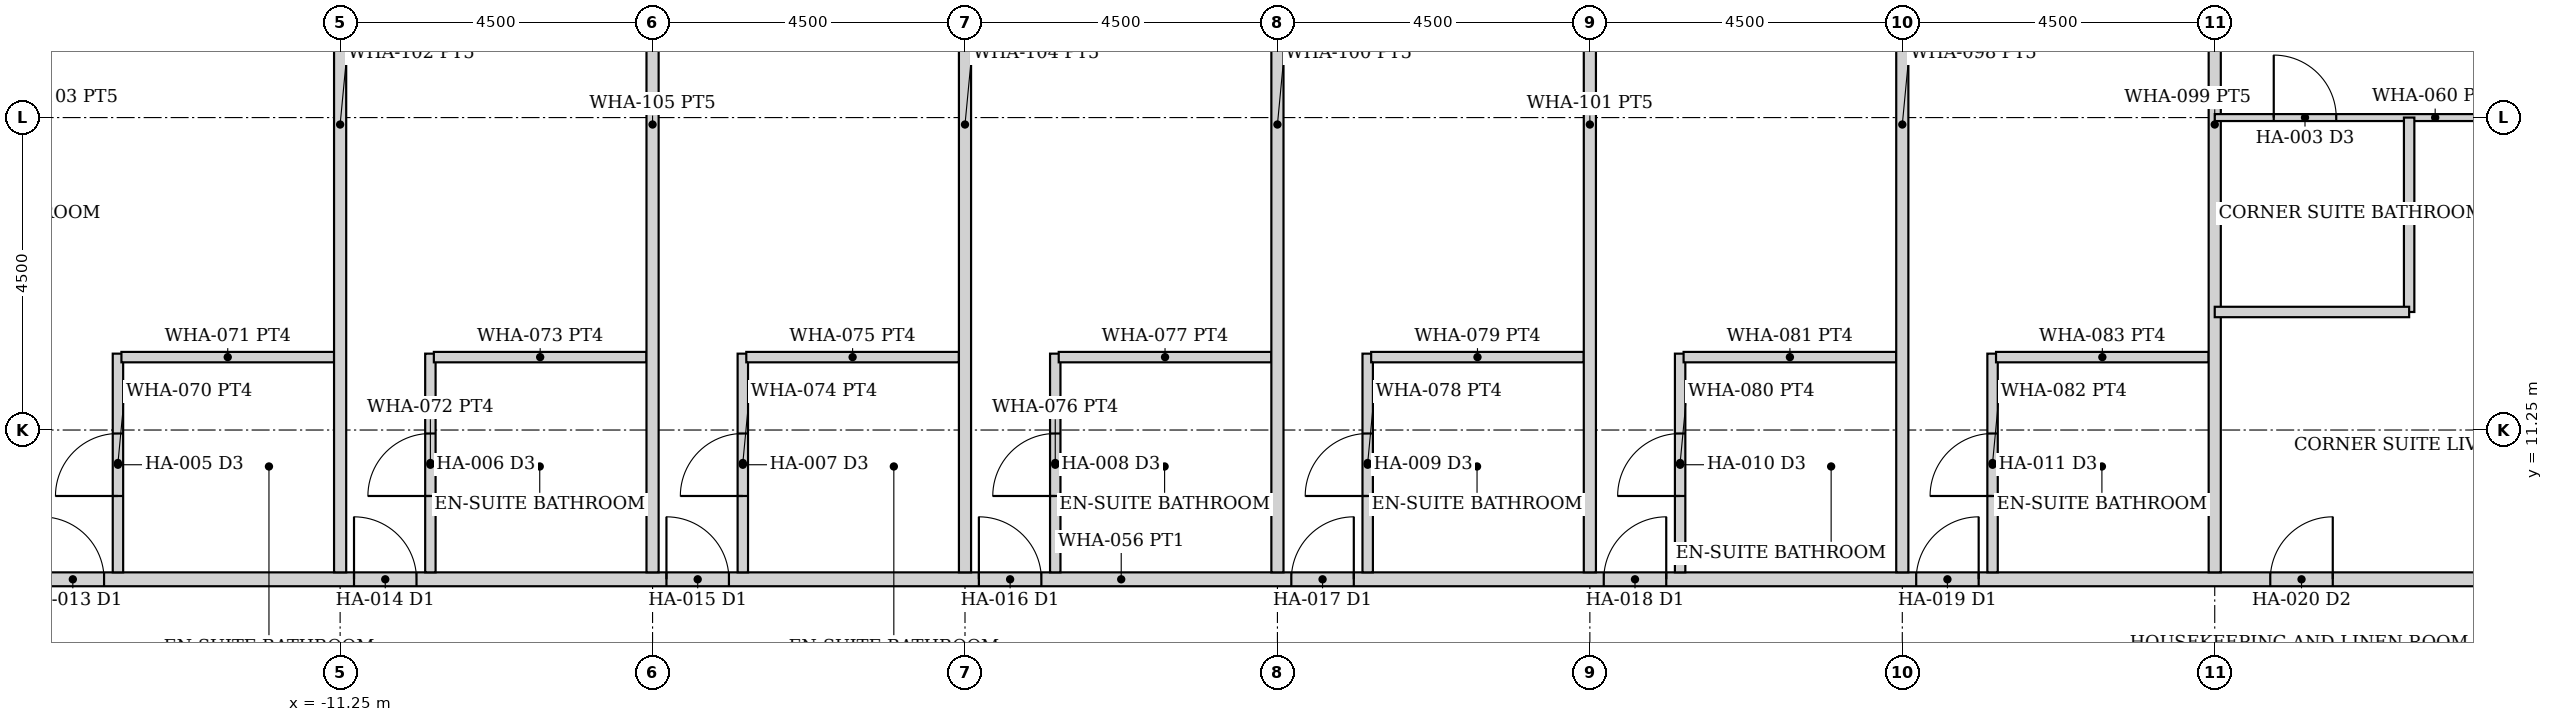
"""IFC4 building model, lengths in metres.
Left out: names, types, materials, properties, quantities, classifications, styles, units other than length and angle.
Written with IfcOpenShell. Run it as: python <this file> out.ifc"""

import sys

from ifc_helpers import new_model, si_unit, direction, frame, frame_2d, origin, place, context, subcontext, project, spatial, rectangle, extrude, element, fill, save


model = new_model("IFC4")
c1 = context("Model", 3, precision=1e-05, world=origin(), true_north=direction((0.0, 1.0)))
c2 = subcontext(c1, "Body", "Model", "MODEL_VIEW")
j1 = project(units=[si_unit("LENGTHUNIT", "METRE"), si_unit("PLANEANGLEUNIT", "RADIAN")], contexts=[c1])
p1 = place(None, origin())
s1 = spatial("IfcSite", under=j1, at=p1, CompositionType="ELEMENT")
p2 = place(p1, origin())
s2 = spatial("IfcBuilding", under=s1, at=p2, CompositionType="ELEMENT")
p3 = place(p2, frame((0.0, 0.0, 118.4)))
s3 = spatial("IfcBuildingStorey", under=s2, at=p3, CompositionType="ELEMENT", Elevation=118.4)
p4 = place(p3, frame((-22.3, 9.1, 0.0), z_axis=(0.0, 0.0, 1.0), x_axis=(1.0, 0.0, 0.0)))
e1 = element("IfcWall", 1, at=p4, inside=s3, PredefinedType="PARTITIONING", context=c2, shape_type="SweptSolid", body=[
    extrude(rectangle(XDim=44.6, YDim=0.2, at=frame_2d((22.3, 0.0))), origin(), (0.0, 0.0, 1.0), 2.473),
])
p5 = place(p4, frame((6.75, 0.0, 0.0)))
e2 = element("IfcOpeningElement", 2, at=p5, cuts=e1, PredefinedType="OPENING", context=c2, shape_type="SweptSolid", body=[
    extrude(rectangle(XDim=0.9, YDim=2.1, at=frame_2d((0.45, 1.05))), frame((0.0, 0.11, 0.0), z_axis=(0.0, -1.0, 0.0), x_axis=(1.0, 0.0, 0.0)), (0.0, 0.0, 1.0), 0.22),
])
p6 = place(p4, frame((11.25, 0.0, 0.0)))
e3 = element("IfcOpeningElement", 3, at=p6, cuts=e1, PredefinedType="OPENING", context=c2, shape_type="SweptSolid", body=[
    extrude(rectangle(XDim=0.9, YDim=2.1, at=frame_2d((0.45, 1.05))), frame((0.0, 0.11, 0.0), z_axis=(0.0, -1.0, 0.0), x_axis=(1.0, 0.0, 0.0)), (0.0, 0.0, 1.0), 0.22),
])
p7 = place(p4, frame((15.75, 0.0, 0.0)))
e4 = element("IfcOpeningElement", 4, at=p7, cuts=e1, PredefinedType="OPENING", context=c2, shape_type="SweptSolid", body=[
    extrude(rectangle(XDim=0.9, YDim=2.1, at=frame_2d((0.45, 1.05))), frame((0.0, 0.11, 0.0), z_axis=(0.0, -1.0, 0.0), x_axis=(1.0, 0.0, 0.0)), (0.0, 0.0, 1.0), 0.22),
])
p8 = place(p4, frame((20.25, 0.0, 0.0)))
e5 = element("IfcOpeningElement", 5, at=p8, cuts=e1, PredefinedType="OPENING", context=c2, shape_type="SweptSolid", body=[
    extrude(rectangle(XDim=0.9, YDim=2.1, at=frame_2d((0.45, 1.05))), frame((0.0, 0.11, 0.0), z_axis=(0.0, -1.0, 0.0), x_axis=(1.0, 0.0, 0.0)), (0.0, 0.0, 1.0), 0.22),
])
p9 = place(p4, frame((24.75, 0.0, 0.0)))
e6 = element("IfcOpeningElement", 6, at=p9, cuts=e1, PredefinedType="OPENING", context=c2, shape_type="SweptSolid", body=[
    extrude(rectangle(XDim=0.9, YDim=2.1, at=frame_2d((0.45, 1.05))), frame((0.0, 0.11, 0.0), z_axis=(0.0, -1.0, 0.0), x_axis=(1.0, 0.0, 0.0)), (0.0, 0.0, 1.0), 0.22),
])
p10 = place(p4, frame((29.25, 0.0, 0.0)))
e7 = element("IfcOpeningElement", 7, at=p10, cuts=e1, PredefinedType="OPENING", context=c2, shape_type="SweptSolid", body=[
    extrude(rectangle(XDim=0.9, YDim=2.1, at=frame_2d((0.45, 1.05))), frame((0.0, 0.11, 0.0), z_axis=(0.0, -1.0, 0.0), x_axis=(1.0, 0.0, 0.0)), (0.0, 0.0, 1.0), 0.22),
])
p11 = place(p4, frame((33.75, 0.0, 0.0)))
e8 = element("IfcOpeningElement", 8, at=p11, cuts=e1, PredefinedType="OPENING", context=c2, shape_type="SweptSolid", body=[
    extrude(rectangle(XDim=0.9, YDim=2.1, at=frame_2d((0.45, 1.05))), frame((0.0, 0.11, 0.0), z_axis=(0.0, -1.0, 0.0), x_axis=(1.0, 0.0, 0.0)), (0.0, 0.0, 1.0), 0.22),
])
p12 = place(p4, frame((38.85, 0.0, 0.0)))
e9 = element("IfcOpeningElement", 9, at=p12, cuts=e1, PredefinedType="OPENING", context=c2, shape_type="SweptSolid", body=[
    extrude(rectangle(XDim=0.9, YDim=2.1, at=frame_2d((0.45, 1.05))), frame((0.0, 0.11, 0.0), z_axis=(0.0, -1.0, 0.0), x_axis=(1.0, 0.0, 0.0)), (0.0, 0.0, 1.0), 0.22),
])
p13 = place(p4, frame((4.85, 0.0, 0.0)))
e10 = element("IfcOpeningElement", 10, at=p13, cuts=e1, PredefinedType="OPENING", context=c2, shape_type="SweptSolid", body=[
    extrude(rectangle(XDim=0.9, YDim=2.1, at=frame_2d((0.45, 1.05))), frame((0.0, 0.11, 0.0), z_axis=(0.0, -1.0, 0.0), x_axis=(1.0, 0.0, 0.0)), (0.0, 0.0, 1.0), 0.22),
])
p14 = place(p3, frame((-14.45, 9.2, 0.0), z_axis=(0.0, 0.0, 1.0), x_axis=(0.0, 1.0, 0.0)))
e11 = element("IfcWall", 11, at=p14, inside=s3, PredefinedType="PARTITIONING", context=c2, shape_type="SweptSolid", body=[
    extrude(rectangle(XDim=3.15, YDim=0.15, at=frame_2d((1.575, 0.0))), origin(), (0.0, 0.0, 1.0), 2.473),
])
p15 = place(p14, frame((1.1, 0.0, 0.0)))
e12 = element("IfcOpeningElement", 12, at=p15, cuts=e11, PredefinedType="OPENING", context=c2, shape_type="SweptSolid", body=[
    extrude(rectangle(XDim=0.9, YDim=2.1, at=frame_2d((0.45, 1.05))), frame((0.0, 0.085, 0.0), z_axis=(0.0, -1.0, 0.0), x_axis=(1.0, 0.0, 0.0)), (0.0, 0.0, 1.0), 0.17),
])
p16 = place(p3, frame((-14.4, 12.3, 0.0), z_axis=(0.0, 0.0, 1.0), x_axis=(1.0, 0.0, 0.0)))
e13 = element("IfcWall", 13, at=p16, inside=s3, PredefinedType="PARTITIONING", context=c2, shape_type="SweptSolid", body=[
    extrude(rectangle(XDim=3.062, YDim=0.15, at=frame_2d((1.531, 0.0))), origin(), (0.0, 0.0, 1.0), 2.473),
])
p17 = place(p3, frame((-9.95, 9.2, 0.0), z_axis=(0.0, 0.0, 1.0), x_axis=(0.0, 1.0, 0.0)))
e14 = element("IfcWall", 14, at=p17, inside=s3, PredefinedType="PARTITIONING", context=c2, shape_type="SweptSolid", body=[
    extrude(rectangle(XDim=3.15, YDim=0.15, at=frame_2d((1.575, 0.0))), origin(), (0.0, 0.0, 1.0), 2.473),
])
p18 = place(p17, frame((1.1, 0.0, 0.0)))
e15 = element("IfcOpeningElement", 15, at=p18, cuts=e14, PredefinedType="OPENING", context=c2, shape_type="SweptSolid", body=[
    extrude(rectangle(XDim=0.9, YDim=2.1, at=frame_2d((0.45, 1.05))), frame((0.0, 0.085, 0.0), z_axis=(0.0, -1.0, 0.0), x_axis=(1.0, 0.0, 0.0)), (0.0, 0.0, 1.0), 0.17),
])
p19 = place(p3, frame((-9.9, 12.3, 0.0), z_axis=(0.0, 0.0, 1.0), x_axis=(1.0, 0.0, 0.0)))
e16 = element("IfcWall", 16, at=p19, inside=s3, PredefinedType="PARTITIONING", context=c2, shape_type="SweptSolid", body=[
    extrude(rectangle(XDim=3.062, YDim=0.15, at=frame_2d((1.531, 0.0))), origin(), (0.0, 0.0, 1.0), 2.473),
])
p20 = place(p3, frame((-5.45, 9.2, 0.0), z_axis=(0.0, 0.0, 1.0), x_axis=(0.0, 1.0, 0.0)))
e17 = element("IfcWall", 17, at=p20, inside=s3, PredefinedType="PARTITIONING", context=c2, shape_type="SweptSolid", body=[
    extrude(rectangle(XDim=3.15, YDim=0.15, at=frame_2d((1.575, 0.0))), origin(), (0.0, 0.0, 1.0), 2.473),
])
p21 = place(p20, frame((1.1, 0.0, 0.0)))
e18 = element("IfcOpeningElement", 18, at=p21, cuts=e17, PredefinedType="OPENING", context=c2, shape_type="SweptSolid", body=[
    extrude(rectangle(XDim=0.9, YDim=2.1, at=frame_2d((0.45, 1.05))), frame((0.0, 0.085, 0.0), z_axis=(0.0, -1.0, 0.0), x_axis=(1.0, 0.0, 0.0)), (0.0, 0.0, 1.0), 0.17),
])
p22 = place(p3, frame((-5.4, 12.3, 0.0), z_axis=(0.0, 0.0, 1.0), x_axis=(1.0, 0.0, 0.0)))
e19 = element("IfcWall", 19, at=p22, inside=s3, PredefinedType="PARTITIONING", context=c2, shape_type="SweptSolid", body=[
    extrude(rectangle(XDim=3.062, YDim=0.15, at=frame_2d((1.531, 0.0))), origin(), (0.0, 0.0, 1.0), 2.473),
])
p23 = place(p3, frame((-0.95, 9.2, 0.0), z_axis=(0.0, 0.0, 1.0), x_axis=(0.0, 1.0, 0.0)))
e20 = element("IfcWall", 20, at=p23, inside=s3, PredefinedType="PARTITIONING", context=c2, shape_type="SweptSolid", body=[
    extrude(rectangle(XDim=3.15, YDim=0.15, at=frame_2d((1.575, 0.0))), origin(), (0.0, 0.0, 1.0), 2.473),
])
p24 = place(p23, frame((1.1, 0.0, 0.0)))
e21 = element("IfcOpeningElement", 21, at=p24, cuts=e20, PredefinedType="OPENING", context=c2, shape_type="SweptSolid", body=[
    extrude(rectangle(XDim=0.9, YDim=2.1, at=frame_2d((0.45, 1.05))), frame((0.0, 0.085, 0.0), z_axis=(0.0, -1.0, 0.0), x_axis=(1.0, 0.0, 0.0)), (0.0, 0.0, 1.0), 0.17),
])
p25 = place(p3, frame((-0.9, 12.3, 0.0), z_axis=(0.0, 0.0, 1.0), x_axis=(1.0, 0.0, 0.0)))
e22 = element("IfcWall", 22, at=p25, inside=s3, PredefinedType="PARTITIONING", context=c2, shape_type="SweptSolid", body=[
    extrude(rectangle(XDim=3.062, YDim=0.15, at=frame_2d((1.531, 0.0))), origin(), (0.0, 0.0, 1.0), 2.473),
])
p26 = place(p3, frame((3.55, 9.2, 0.0), z_axis=(0.0, 0.0, 1.0), x_axis=(0.0, 1.0, 0.0)))
e23 = element("IfcWall", 23, at=p26, inside=s3, PredefinedType="PARTITIONING", context=c2, shape_type="SweptSolid", body=[
    extrude(rectangle(XDim=3.15, YDim=0.15, at=frame_2d((1.575, 0.0))), origin(), (0.0, 0.0, 1.0), 2.473),
])
p27 = place(p26, frame((1.1, 0.0, 0.0)))
e24 = element("IfcOpeningElement", 24, at=p27, cuts=e23, PredefinedType="OPENING", context=c2, shape_type="SweptSolid", body=[
    extrude(rectangle(XDim=0.9, YDim=2.1, at=frame_2d((0.45, 1.05))), frame((0.0, 0.085, 0.0), z_axis=(0.0, -1.0, 0.0), x_axis=(1.0, 0.0, 0.0)), (0.0, 0.0, 1.0), 0.17),
])
p28 = place(p3, frame((3.6, 12.3, 0.0), z_axis=(0.0, 0.0, 1.0), x_axis=(1.0, 0.0, 0.0)))
e25 = element("IfcWall", 25, at=p28, inside=s3, PredefinedType="PARTITIONING", context=c2, shape_type="SweptSolid", body=[
    extrude(rectangle(XDim=3.062, YDim=0.15, at=frame_2d((1.531, 0.0))), origin(), (0.0, 0.0, 1.0), 2.473),
])
p29 = place(p3, frame((8.05, 9.2, 0.0), z_axis=(0.0, 0.0, 1.0), x_axis=(0.0, 1.0, 0.0)))
e26 = element("IfcWall", 26, at=p29, inside=s3, PredefinedType="PARTITIONING", context=c2, shape_type="SweptSolid", body=[
    extrude(rectangle(XDim=3.15, YDim=0.15, at=frame_2d((1.575, 0.0))), origin(), (0.0, 0.0, 1.0), 2.473),
])
p30 = place(p29, frame((1.1, 0.0, 0.0)))
e27 = element("IfcOpeningElement", 27, at=p30, cuts=e26, PredefinedType="OPENING", context=c2, shape_type="SweptSolid", body=[
    extrude(rectangle(XDim=0.9, YDim=2.1, at=frame_2d((0.45, 1.05))), frame((0.0, 0.085, 0.0), z_axis=(0.0, -1.0, 0.0), x_axis=(1.0, 0.0, 0.0)), (0.0, 0.0, 1.0), 0.17),
])
p31 = place(p3, frame((8.1, 12.3, 0.0), z_axis=(0.0, 0.0, 1.0), x_axis=(1.0, 0.0, 0.0)))
e28 = element("IfcWall", 28, at=p31, inside=s3, PredefinedType="PARTITIONING", context=c2, shape_type="SweptSolid", body=[
    extrude(rectangle(XDim=3.062, YDim=0.15, at=frame_2d((1.531, 0.0))), origin(), (0.0, 0.0, 1.0), 2.473),
])
p32 = place(p3, frame((12.55, 9.2, 0.0), z_axis=(0.0, 0.0, 1.0), x_axis=(0.0, 1.0, 0.0)))
e29 = element("IfcWall", 29, at=p32, inside=s3, PredefinedType="PARTITIONING", context=c2, shape_type="SweptSolid", body=[
    extrude(rectangle(XDim=3.15, YDim=0.15, at=frame_2d((1.575, 0.0))), origin(), (0.0, 0.0, 1.0), 2.473),
])
p33 = place(p32, frame((1.1, 0.0, 0.0)))
e30 = element("IfcOpeningElement", 30, at=p33, cuts=e29, PredefinedType="OPENING", context=c2, shape_type="SweptSolid", body=[
    extrude(rectangle(XDim=0.9, YDim=2.1, at=frame_2d((0.45, 1.05))), frame((0.0, 0.085, 0.0), z_axis=(0.0, -1.0, 0.0), x_axis=(1.0, 0.0, 0.0)), (0.0, 0.0, 1.0), 0.17),
])
p34 = place(p3, frame((12.6, 12.3, 0.0), z_axis=(0.0, 0.0, 1.0), x_axis=(1.0, 0.0, 0.0)))
e31 = element("IfcWall", 31, at=p34, inside=s3, PredefinedType="PARTITIONING", context=c2, shape_type="SweptSolid", body=[
    extrude(rectangle(XDim=3.062, YDim=0.15, at=frame_2d((1.531, 0.0))), origin(), (0.0, 0.0, 1.0), 2.473),
])
for number, where, z_axis, x_axis in (
    (32, (-11.25, 9.2, 0.0), (0.0, 0.0, 1.0), (0.0, 1.0, 0.0)),
    (33, (-6.75, 9.2, 0.0), (0.0, 0.0, 1.0), (0.0, 1.0, 0.0)),
    (34, (-2.25, 9.2, 0.0), (0.0, 0.0, 1.0), (0.0, 1.0, 0.0)),
    (35, (2.25, 9.2, 0.0), (0.0, 0.0, 1.0), (0.0, 1.0, 0.0)),
    (36, (6.75, 9.2, 0.0), (0.0, 0.0, 1.0), (0.0, 1.0, 0.0)),
    (37, (11.25, 9.2, 0.0), (0.0, 0.0, 1.0), (0.0, 1.0, 0.0)),
    (38, (15.75, 9.2, 0.0), (0.0, 0.0, 1.0), (0.0, 1.0, 0.0)),
):
    element("IfcWall", number, at=place(p3, frame(where, z_axis=z_axis, x_axis=x_axis)), inside=s3, PredefinedType="PARTITIONING", context=c2, shape_type="SweptSolid", body=[
        extrude(rectangle(XDim=12.9, YDim=0.175, at=frame_2d((6.45, 0.0))), origin(), (0.0, 0.0, 1.0), 2.473),
    ])
p35 = place(p3, frame((15.75, 15.75, 0.0), z_axis=(0.0, 0.0, 1.0), x_axis=(1.0, 0.0, 0.0)))
e39 = element("IfcWall", 39, at=p35, inside=s3, PredefinedType="PARTITIONING", context=c2, shape_type="SweptSolid", body=[
    extrude(rectangle(XDim=6.35, YDim=0.1, at=frame_2d((3.175, 0.0))), origin(), (0.0, 0.0, 1.0), 2.473),
])
p36 = place(p35, frame((4.125, 0.0, 0.0)))
e40 = element("IfcOpeningElement", 40, at=p36, cuts=e39, PredefinedType="OPENING", context=c2, shape_type="SweptSolid", body=[
    extrude(rectangle(XDim=0.85, YDim=2.1, at=frame_2d((0.425, 1.05))), frame((0.0, 0.06, 0.0), z_axis=(0.0, -1.0, 0.0), x_axis=(1.0, 0.0, 0.0)), (0.0, 0.0, 1.0), 0.12),
])
p37 = place(p35, frame((0.85, 0.0, 0.0)))
e41 = element("IfcOpeningElement", 41, at=p37, cuts=e39, PredefinedType="OPENING", context=c2, shape_type="SweptSolid", body=[
    extrude(rectangle(XDim=0.9, YDim=2.1, at=frame_2d((0.45, 1.05))), frame((0.0, 0.06, 0.0), z_axis=(0.0, -1.0, 0.0), x_axis=(1.0, 0.0, 0.0)), (0.0, 0.0, 1.0), 0.12),
])
for number, where, z_axis, x_axis in (
    (42, (18.55, 12.95, 0.0), (0.0, 0.0, 1.0), (0.0, 1.0, 0.0)),
    (43, (15.75, 12.95, 0.0), (0.0, 0.0, 1.0), (1.0, 0.0, 0.0)),
):
    element("IfcWall", number, at=place(p3, frame(where, z_axis=z_axis, x_axis=x_axis)), inside=s3, PredefinedType="PARTITIONING", context=c2, shape_type="SweptSolid", body=[
        extrude(rectangle(XDim=2.8, YDim=0.15, at=frame_2d((1.4, 0.0))), origin(), (0.0, 0.0, 1.0), 2.473),
    ])
p38 = place(p5, origin())
e44 = element("IfcDoor", 44, at=p38, inside=s3, OperationType="SINGLE_SWING_LEFT", PredefinedType="DOOR", context=c2, shape_type="SweptSolid", body=[
    extrude(rectangle(XDim=0.9, YDim=2.1, at=frame_2d((0.45, 1.05))), frame((0.0, 0.025, 0.0), z_axis=(0.0, -1.0, 0.0), x_axis=(1.0, 0.0, 0.0)), (0.0, 0.0, 1.0), 0.05),
])
fill(e2, e44)
p39 = place(p15, origin())
e45 = element("IfcDoor", 45, at=p39, inside=s3, OperationType="SINGLE_SWING_LEFT", PredefinedType="DOOR", context=c2, shape_type="SweptSolid", body=[
    extrude(rectangle(XDim=0.9, YDim=2.1, at=frame_2d((0.45, 1.05))), frame((0.0, 0.025, 0.0), z_axis=(0.0, -1.0, 0.0), x_axis=(1.0, 0.0, 0.0)), (0.0, 0.0, 1.0), 0.05),
])
fill(e12, e45)
p40 = place(p6, origin())
e46 = element("IfcDoor", 46, at=p40, inside=s3, OperationType="SINGLE_SWING_LEFT", PredefinedType="DOOR", context=c2, shape_type="SweptSolid", body=[
    extrude(rectangle(XDim=0.9, YDim=2.1, at=frame_2d((0.45, 1.05))), frame((0.0, 0.025, 0.0), z_axis=(0.0, -1.0, 0.0), x_axis=(1.0, 0.0, 0.0)), (0.0, 0.0, 1.0), 0.05),
])
fill(e3, e46)
p41 = place(p18, origin())
e47 = element("IfcDoor", 47, at=p41, inside=s3, OperationType="SINGLE_SWING_LEFT", PredefinedType="DOOR", context=c2, shape_type="SweptSolid", body=[
    extrude(rectangle(XDim=0.9, YDim=2.1, at=frame_2d((0.45, 1.05))), frame((0.0, 0.025, 0.0), z_axis=(0.0, -1.0, 0.0), x_axis=(1.0, 0.0, 0.0)), (0.0, 0.0, 1.0), 0.05),
])
fill(e15, e47)
p42 = place(p7, origin())
e48 = element("IfcDoor", 48, at=p42, inside=s3, OperationType="SINGLE_SWING_LEFT", PredefinedType="DOOR", context=c2, shape_type="SweptSolid", body=[
    extrude(rectangle(XDim=0.9, YDim=2.1, at=frame_2d((0.45, 1.05))), frame((0.0, 0.025, 0.0), z_axis=(0.0, -1.0, 0.0), x_axis=(1.0, 0.0, 0.0)), (0.0, 0.0, 1.0), 0.05),
])
fill(e4, e48)
p43 = place(p21, origin())
e49 = element("IfcDoor", 49, at=p43, inside=s3, OperationType="SINGLE_SWING_LEFT", PredefinedType="DOOR", context=c2, shape_type="SweptSolid", body=[
    extrude(rectangle(XDim=0.9, YDim=2.1, at=frame_2d((0.45, 1.05))), frame((0.0, 0.025, 0.0), z_axis=(0.0, -1.0, 0.0), x_axis=(1.0, 0.0, 0.0)), (0.0, 0.0, 1.0), 0.05),
])
fill(e18, e49)
p44 = place(p8, origin())
e50 = element("IfcDoor", 50, at=p44, inside=s3, OperationType="SINGLE_SWING_LEFT", PredefinedType="DOOR", context=c2, shape_type="SweptSolid", body=[
    extrude(rectangle(XDim=0.9, YDim=2.1, at=frame_2d((0.45, 1.05))), frame((0.0, 0.025, 0.0), z_axis=(0.0, -1.0, 0.0), x_axis=(1.0, 0.0, 0.0)), (0.0, 0.0, 1.0), 0.05),
])
fill(e5, e50)
p45 = place(p24, origin())
e51 = element("IfcDoor", 51, at=p45, inside=s3, OperationType="SINGLE_SWING_LEFT", PredefinedType="DOOR", context=c2, shape_type="SweptSolid", body=[
    extrude(rectangle(XDim=0.9, YDim=2.1, at=frame_2d((0.45, 1.05))), frame((0.0, 0.025, 0.0), z_axis=(0.0, -1.0, 0.0), x_axis=(1.0, 0.0, 0.0)), (0.0, 0.0, 1.0), 0.05),
])
fill(e21, e51)
p46 = place(p9, origin())
e52 = element("IfcDoor", 52, at=p46, inside=s3, OperationType="SINGLE_SWING_RIGHT", PredefinedType="DOOR", context=c2, shape_type="SweptSolid", body=[
    extrude(rectangle(XDim=0.9, YDim=2.1, at=frame_2d((0.45, 1.05))), frame((0.0, 0.025, 0.0), z_axis=(0.0, -1.0, 0.0), x_axis=(1.0, 0.0, 0.0)), (0.0, 0.0, 1.0), 0.05),
])
fill(e6, e52)
p47 = place(p27, origin())
e53 = element("IfcDoor", 53, at=p47, inside=s3, OperationType="SINGLE_SWING_LEFT", PredefinedType="DOOR", context=c2, shape_type="SweptSolid", body=[
    extrude(rectangle(XDim=0.9, YDim=2.1, at=frame_2d((0.45, 1.05))), frame((0.0, 0.025, 0.0), z_axis=(0.0, -1.0, 0.0), x_axis=(1.0, 0.0, 0.0)), (0.0, 0.0, 1.0), 0.05),
])
fill(e24, e53)
p48 = place(p10, origin())
e54 = element("IfcDoor", 54, at=p48, inside=s3, OperationType="SINGLE_SWING_RIGHT", PredefinedType="DOOR", context=c2, shape_type="SweptSolid", body=[
    extrude(rectangle(XDim=0.9, YDim=2.1, at=frame_2d((0.45, 1.05))), frame((0.0, 0.025, 0.0), z_axis=(0.0, -1.0, 0.0), x_axis=(1.0, 0.0, 0.0)), (0.0, 0.0, 1.0), 0.05),
])
fill(e7, e54)
p49 = place(p30, origin())
e55 = element("IfcDoor", 55, at=p49, inside=s3, OperationType="SINGLE_SWING_LEFT", PredefinedType="DOOR", context=c2, shape_type="SweptSolid", body=[
    extrude(rectangle(XDim=0.9, YDim=2.1, at=frame_2d((0.45, 1.05))), frame((0.0, 0.025, 0.0), z_axis=(0.0, -1.0, 0.0), x_axis=(1.0, 0.0, 0.0)), (0.0, 0.0, 1.0), 0.05),
])
fill(e27, e55)
p50 = place(p11, origin())
e56 = element("IfcDoor", 56, at=p50, inside=s3, OperationType="SINGLE_SWING_RIGHT", PredefinedType="DOOR", context=c2, shape_type="SweptSolid", body=[
    extrude(rectangle(XDim=0.9, YDim=2.1, at=frame_2d((0.45, 1.05))), frame((0.0, 0.025, 0.0), z_axis=(0.0, -1.0, 0.0), x_axis=(1.0, 0.0, 0.0)), (0.0, 0.0, 1.0), 0.05),
])
fill(e8, e56)
p51 = place(p33, origin())
e57 = element("IfcDoor", 57, at=p51, inside=s3, OperationType="SINGLE_SWING_LEFT", PredefinedType="DOOR", context=c2, shape_type="SweptSolid", body=[
    extrude(rectangle(XDim=0.9, YDim=2.1, at=frame_2d((0.45, 1.05))), frame((0.0, 0.025, 0.0), z_axis=(0.0, -1.0, 0.0), x_axis=(1.0, 0.0, 0.0)), (0.0, 0.0, 1.0), 0.05),
])
fill(e30, e57)
p52 = place(p12, origin())
e58 = element("IfcDoor", 58, at=p52, inside=s3, OperationType="SINGLE_SWING_RIGHT", PredefinedType="DOOR", context=c2, shape_type="SweptSolid", body=[
    extrude(rectangle(XDim=0.9, YDim=2.1, at=frame_2d((0.45, 1.05))), frame((0.0, 0.025, 0.0), z_axis=(0.0, -1.0, 0.0), x_axis=(1.0, 0.0, 0.0)), (0.0, 0.0, 1.0), 0.05),
])
fill(e9, e58)
p53 = place(p37, origin())
e59 = element("IfcDoor", 59, at=p53, inside=s3, OperationType="SINGLE_SWING_LEFT", PredefinedType="DOOR", context=c2, shape_type="SweptSolid", body=[
    extrude(rectangle(XDim=0.9, YDim=2.1, at=frame_2d((0.45, 1.05))), frame((0.0, 0.025, 0.0), z_axis=(0.0, -1.0, 0.0), x_axis=(1.0, 0.0, 0.0)), (0.0, 0.0, 1.0), 0.05),
])
fill(e41, e59)
save(model, sys.argv[1])
